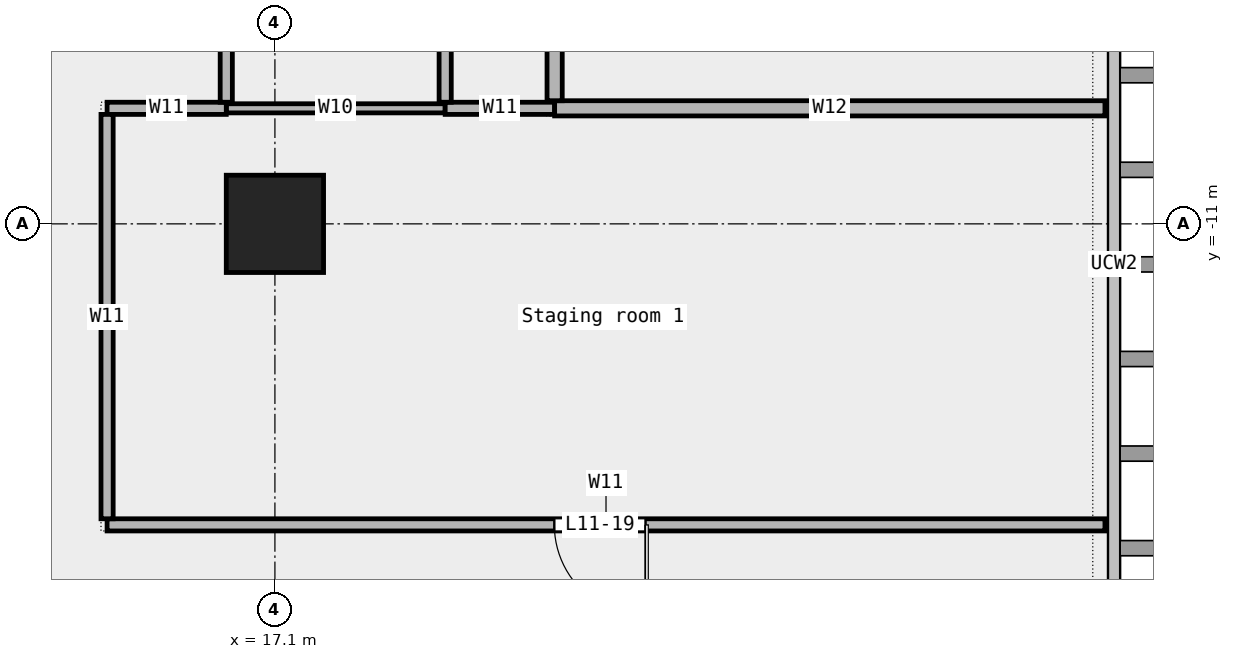
"""IFC4 building model, lengths in metres.
Left out: names, types, materials, properties, quantities, classifications, styles, units other than length and angle.
Written with IfcOpenShell. Run it as: python <this file> out.ifc"""

import sys

from ifc_helpers import new_model, si_unit, direction, frame, frame_2d, origin, origin_2d, place, context, subcontext, project, spatial, rectangle, extrude, element, fill, save


model = new_model("IFC4")
c1 = context("Model", 3, precision=1e-05, world=origin(), true_north=direction((0.0, 1.0)))
c2 = subcontext(c1, "Body", "Model", "MODEL_VIEW")
j1 = project(units=[si_unit("LENGTHUNIT", "METRE"), si_unit("PLANEANGLEUNIT", "RADIAN")], contexts=[c1])
p1 = place(None, origin())
s1 = spatial("IfcSite", under=j1, at=p1, CompositionType="ELEMENT")
p2 = place(p1, origin())
s2 = spatial("IfcBuilding", under=s1, at=p2, CompositionType="ELEMENT")
p3 = place(p2, frame((0.0, 0.0, 59.8)))
s3 = spatial("IfcBuildingStorey", under=s2, at=p3, CompositionType="ELEMENT", Elevation=59.8)
p4 = place(p3, frame((17.1, -11.0, 0.0), z_axis=(0.0, 0.0, 1.0), x_axis=(1.0, 0.0, 0.0)))
e1 = element("IfcColumn", 1, at=p4, inside=s3, PredefinedType="COLUMN", context=c2, shape_type="SweptSolid", body=[
    extrude(rectangle(XDim=1.6, YDim=1.6, at=origin_2d()), origin(), (0.0, 0.0, 1.0), 4.35),
])
p5 = place(p3, frame((14.34, -15.95, 0.0), z_axis=(0.0, 0.0, 1.0), x_axis=(1.0, 0.0, 0.0)))
e2 = element("IfcWall", 2, at=p5, inside=s3, PredefinedType="PARTITIONING", context=c2, shape_type="SweptSolid", body=[
    extrude(rectangle(XDim=16.41, YDim=0.2, at=frame_2d((8.205, 0.0))), origin(), (0.0, 0.0, 1.0), 4.35),
])
p6 = place(p5, frame((7.355, 0.0, 0.0)))
e3 = element("IfcOpeningElement", 3, at=p6, cuts=e2, PredefinedType="OPENING", context=c2, shape_type="SweptSolid", body=[
    extrude(rectangle(XDim=1.5, YDim=2.1, at=frame_2d((0.75, 1.05))), frame((0.0, 0.112, 0.0), z_axis=(0.0, -1.0, 0.0), x_axis=(1.0, 0.0, 0.0)), (0.0, 0.0, 1.0), 0.224),
])
p7 = place(p3, frame((16.3, -9.1, 0.0), z_axis=(0.0, 0.0, 1.0), x_axis=(1.0, 0.0, 0.0)))
e4 = element("IfcWall", 4, at=p7, inside=s3, PredefinedType="PARTITIONING", context=c2, shape_type="SweptSolid", body=[
    extrude(rectangle(XDim=3.6, YDim=0.15, at=frame_2d((1.8, 0.0))), origin(), (0.0, 0.0, 1.0), 4.35),
])
p8 = place(p3, frame((14.34, -9.1, 0.0), z_axis=(0.0, 0.0, 1.0), x_axis=(1.0, 0.0, 0.0)))
e5 = element("IfcWall", 5, at=p8, inside=s3, PredefinedType="PARTITIONING", context=c2, shape_type="SweptSolid", body=[
    extrude(rectangle(XDim=1.96, YDim=0.2, at=frame_2d((0.98, 0.0))), origin(), (0.0, 0.0, 1.0), 4.35),
])
p9 = place(p3, frame((19.9, -9.1, 0.0), z_axis=(0.0, 0.0, 1.0), x_axis=(1.0, 0.0, 0.0)))
e6 = element("IfcWall", 6, at=p9, inside=s3, PredefinedType="PARTITIONING", context=c2, shape_type="SweptSolid", body=[
    extrude(rectangle(XDim=1.8, YDim=0.2, at=frame_2d((0.9, 0.0))), origin(), (0.0, 0.0, 1.0), 4.35),
])
p10 = place(p3, frame((21.7, -9.1, 0.0), z_axis=(0.0, 0.0, 1.0), x_axis=(1.0, 0.0, 0.0)))
e7 = element("IfcWall", 7, at=p10, inside=s3, PredefinedType="PARTITIONING", context=c2, shape_type="SweptSolid", body=[
    extrude(rectangle(XDim=9.05, YDim=0.25, at=frame_2d((4.525, 0.0))), origin(), (0.0, 0.0, 1.0), 4.35),
])
p11 = place(p3, frame((14.34, -15.85, 0.0), z_axis=(0.0, 0.0, 1.0), x_axis=(0.0, 1.0, 0.0)))
e8 = element("IfcWall", 8, at=p11, inside=s3, PredefinedType="PARTITIONING", context=c2, shape_type="SweptSolid", body=[
    extrude(rectangle(XDim=6.65, YDim=0.2, at=frame_2d((3.325, 0.0))), origin(), (0.0, 0.0, 1.0), 4.35),
])
p12 = place(p3, frame((16.3, -9.0, 0.0), z_axis=(0.0, 0.0, 1.0), x_axis=(0.0, 1.0, 0.0)))
e9 = element("IfcWall", 9, at=p12, inside=s3, PredefinedType="PARTITIONING", context=c2, shape_type="SweptSolid", body=[
    extrude(rectangle(XDim=5.975, YDim=0.2, at=frame_2d((2.988, 0.0))), origin(), (0.0, 0.0, 1.0), 4.35),
])
p13 = place(p3, frame((19.9, -9.0, 0.0), z_axis=(0.0, 0.0, 1.0), x_axis=(0.0, 1.0, 0.0)))
e10 = element("IfcWall", 10, at=p13, inside=s3, PredefinedType="PARTITIONING", context=c2, shape_type="SweptSolid", body=[
    extrude(rectangle(XDim=5.975, YDim=0.2, at=frame_2d((2.988, 0.0))), origin(), (0.0, 0.0, 1.0), 4.35),
])
p14 = place(p13, frame((2.538, 0.0, 0.0)))
e11 = element("IfcOpeningElement", 11, at=p14, cuts=e10, PredefinedType="OPENING", context=c2, shape_type="SweptSolid", body=[
    extrude(rectangle(XDim=0.9, YDim=2.1, at=frame_2d((0.45, 1.05))), frame((0.0, 0.112, 0.0), z_axis=(0.0, -1.0, 0.0), x_axis=(1.0, 0.0, 0.0)), (0.0, 0.0, 1.0), 0.224),
])
p15 = place(p3, frame((21.7, -8.975, 0.0), z_axis=(0.0, 0.0, 1.0), x_axis=(0.0, 1.0, 0.0)))
e12 = element("IfcWall", 12, at=p15, inside=s3, PredefinedType="PARTITIONING", context=c2, shape_type="SweptSolid", body=[
    extrude(rectangle(XDim=6.515, YDim=0.25, at=frame_2d((3.258, 0.0))), origin(), (0.0, 0.0, 1.0), 4.35),
])
p16 = place(p15, frame((2.657, 0.0, 0.0)))
e13 = element("IfcOpeningElement", 13, at=p16, cuts=e12, PredefinedType="OPENING", context=c2, shape_type="SweptSolid", body=[
    extrude(rectangle(XDim=1.2, YDim=2.1, at=frame_2d((0.6, 1.05))), frame((0.0, 0.137, 0.0), z_axis=(0.0, -1.0, 0.0), x_axis=(1.0, 0.0, 0.0)), (0.0, 0.0, 1.0), 0.274),
])
p17 = place(p6, origin())
e14 = element("IfcDoor", 14, at=p17, inside=s3, OperationType="DOUBLE_DOOR_SINGLE_SWING", PredefinedType="DOOR", context=c2, shape_type="SweptSolid", body=[
    extrude(rectangle(XDim=1.5, YDim=2.1, at=frame_2d((0.75, 1.05))), frame((0.0, 0.025, 0.0), z_axis=(0.0, -1.0, 0.0), x_axis=(1.0, 0.0, 0.0)), (0.0, 0.0, 1.0), 0.05),
])
fill(e3, e14)
save(model, sys.argv[1])
